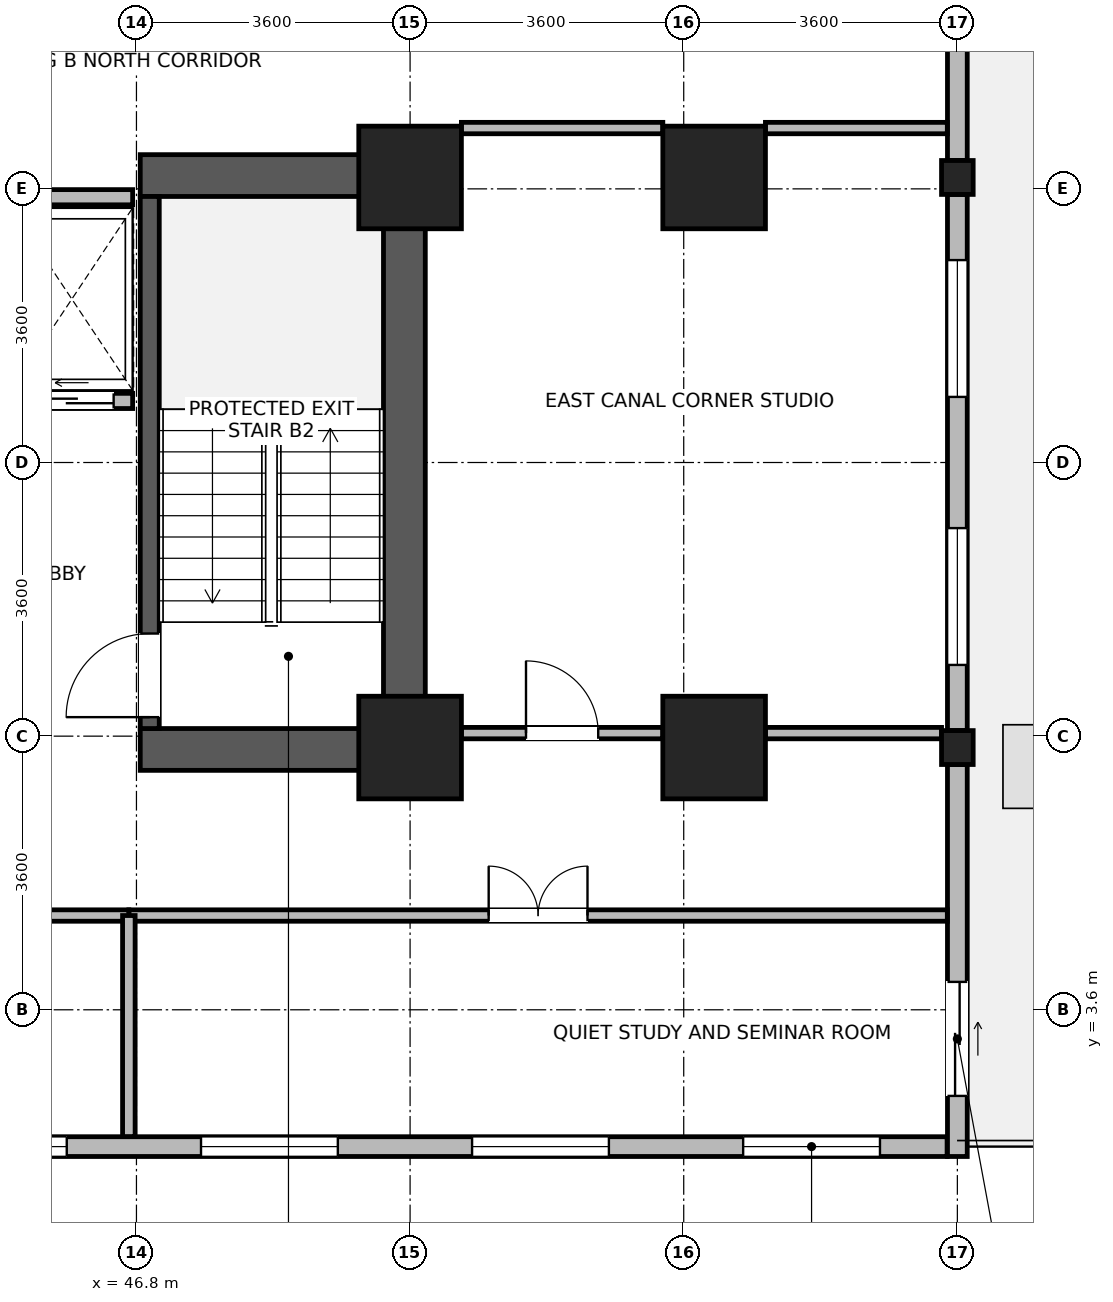
"""IFC4 building model, lengths in metres.
Left out: names, types, materials, properties, quantities, classifications, styles, units other than length and angle.
Written with IfcOpenShell. Run it as: python <this file> out.ifc"""

import sys

from ifc_helpers import new_model, si_unit, direction, frame, frame_2d, origin, origin_2d, place, context, subcontext, project, spatial, rectangle, i_section, extrude, source, transform, mapped, element, fill, save


model = new_model("IFC4")
c1 = context("Model", 3, precision=1e-05, world=origin(), true_north=direction((0.0, 1.0)))
c2 = subcontext(c1, "Body", "Model", "MODEL_VIEW")
j1 = project(units=[si_unit("LENGTHUNIT", "METRE"), si_unit("PLANEANGLEUNIT", "RADIAN")], contexts=[c1])
p1 = place(None, origin())
s1 = spatial("IfcSite", under=j1, at=p1, CompositionType="ELEMENT")
p2 = place(p1, origin())
s2 = spatial("IfcBuilding", under=s1, at=p2, CompositionType="ELEMENT")
p3 = place(p2, frame((0.0, 0.0, 43.8)))
s3 = spatial("IfcBuildingStorey", under=s2, at=p3, CompositionType="ELEMENT", Elevation=43.8)
p4 = place(p3, frame((50.325, 6.75, 0.0), z_axis=(0.0, 0.0, 1.0), x_axis=(0.0, 1.0, 0.0)))
e1 = element("IfcWall", 1, at=p4, inside=s3, PredefinedType="SHEAR", context=c2, shape_type="SweptSolid", body=[
    extrude(rectangle(XDim=8.1, YDim=0.55, at=frame_2d((4.05, 0.0))), origin(), (0.0, 0.0, 1.0), 3.45),
])
for number, where, z_axis, x_axis in (
    (2, (46.85, 7.025, 0.0), (0.0, 0.0, 1.0), (1.0, 0.0, 0.0)),
    (3, (46.85, 14.575, 0.0), (0.0, 0.0, 1.0), (1.0, 0.0, 0.0)),
):
    element("IfcWall", number, at=place(p3, frame(where, z_axis=z_axis, x_axis=x_axis)), inside=s3, PredefinedType="SHEAR", context=c2, shape_type="SweptSolid", body=[
        extrude(rectangle(XDim=3.2, YDim=0.55, at=frame_2d((1.6, 0.0))), origin(), (0.0, 0.0, 1.0), 3.45),
    ])
p5 = place(p3, frame((46.975, 7.3, 0.0), z_axis=(0.0, 0.0, 1.0), x_axis=(0.0, 1.0, 0.0)))
e4 = element("IfcWall", 4, at=p5, inside=s3, PredefinedType="SHEAR", context=c2, shape_type="SweptSolid", body=[
    extrude(rectangle(XDim=7.0, YDim=0.25, at=frame_2d((3.5, 0.0))), origin(), (0.0, 0.0, 1.0), 3.45),
])
p6 = place(p5, frame((0.15, 0.0, 0.0)))
e5 = element("IfcOpeningElement", 5, at=p6, cuts=e4, PredefinedType="OPENING", context=c2, shape_type="SweptSolid", body=[
    extrude(rectangle(XDim=1.1, YDim=2.08, at=frame_2d((0.55, 1.04))), frame((0.0, 0.135, 0.0), z_axis=(0.0, -1.0, 0.0), x_axis=(1.0, 0.0, 0.0)), (0.0, 0.0, 1.0), 0.27),
])
m1 = source(origin(), c2, "Body", "SweptSolid", [
    extrude(rectangle(XDim=1.35, YDim=1.35, at=origin_2d()), origin(), (0.0, 0.0, 1.0), 3.7),
])
for number, where, z_axis, x_axis in (
    (6, (50.4, 7.05, 0.0), (0.0, 0.0, 1.0), (1.0, 0.0, 0.0)),
    (7, (50.4, 14.55, 0.0), (0.0, 0.0, 1.0), (1.0, 0.0, 0.0)),
    (8, (54.4, 7.05, 0.0), (0.0, 0.0, 1.0), (1.0, 0.0, 0.0)),
    (9, (54.4, 14.55, 0.0), (0.0, 0.0, 1.0), (1.0, 0.0, 0.0)),
):
    element("IfcColumn", number, at=place(p3, frame(where, z_axis=z_axis, x_axis=x_axis)), inside=s3, PredefinedType="COLUMN", context=c2, shape_type="MappedRepresentation", body=[
        mapped(m1, transform((0.0, 0.0, 0.0), x_axis=(1.0, 0.0, 0.0), y_axis=(0.0, 1.0, 0.0), z_axis=(0.0, 0.0, 1.0), scale=1.0)),
    ])
m2 = source(origin(), c2, "Body", "SweptSolid", [
    extrude(i_section(OverallWidth=0.416, OverallDepth=0.446, WebThickness=0.029, FlangeThickness=0.04, FilletRadius=0.015, at=origin_2d()), origin(), (0.0, 0.0, 1.0), 3.7),
])
for number, where, z_axis, x_axis in (
    (10, (57.6, 7.05, 0.0), (0.0, 0.0, 1.0), (1.0, 0.0, 0.0)),
    (11, (57.6, 14.55, 0.0), (0.0, 0.0, 1.0), (1.0, 0.0, 0.0)),
):
    element("IfcColumn", number, at=place(p3, frame(where, z_axis=z_axis, x_axis=x_axis)), inside=s3, PredefinedType="COLUMN", context=c2, shape_type="MappedRepresentation", body=[
        mapped(m2, transform((0.0, 0.0, 0.0), x_axis=(1.0, 0.0, 0.0), y_axis=(0.0, 1.0, 0.0), z_axis=(0.0, 0.0, 1.0), scale=1.0)),
    ])
p7 = place(p3, frame((57.465, 1.8, 0.0), z_axis=(0.0, 0.0, 1.0), x_axis=(-1.0, 0.0, 0.0)))
e12 = element("IfcWall", 12, at=p7, inside=s3, PredefinedType="STANDARD", context=c2, shape_type="SweptSolid", body=[
    extrude(rectangle(XDim=28.53, YDim=0.26, at=frame_2d((14.265, 0.0))), origin(), (0.0, 0.0, 1.0), 3.43),
])
p8 = place(p7, frame((0.883, 0.0, 0.85)))
e13 = element("IfcOpeningElement", 13, at=p8, cuts=e12, PredefinedType="OPENING", context=c2, shape_type="SweptSolid", body=[
    extrude(rectangle(XDim=1.8, YDim=1.85, at=frame_2d((0.9, 0.925))), frame((0.0, 0.14, 0.0), z_axis=(0.0, -1.0, 0.0), x_axis=(1.0, 0.0, 0.0)), (0.0, 0.0, 1.0), 0.28),
])
p9 = place(p7, frame((4.449, 0.0, 0.85)))
e14 = element("IfcOpeningElement", 14, at=p9, cuts=e12, PredefinedType="OPENING", context=c2, shape_type="SweptSolid", body=[
    extrude(rectangle(XDim=1.8, YDim=1.85, at=frame_2d((0.9, 0.925))), frame((0.0, 0.14, 0.0), z_axis=(0.0, -1.0, 0.0), x_axis=(1.0, 0.0, 0.0)), (0.0, 0.0, 1.0), 0.28),
])
p10 = place(p7, frame((8.016, 0.0, 0.85)))
e15 = element("IfcOpeningElement", 15, at=p10, cuts=e12, PredefinedType="OPENING", context=c2, shape_type="SweptSolid", body=[
    extrude(rectangle(XDim=1.8, YDim=1.85, at=frame_2d((0.9, 0.925))), frame((0.0, 0.14, 0.0), z_axis=(0.0, -1.0, 0.0), x_axis=(1.0, 0.0, 0.0)), (0.0, 0.0, 1.0), 0.28),
])
p11 = place(p7, frame((11.582, 0.0, 0.85)))
e16 = element("IfcOpeningElement", 16, at=p11, cuts=e12, PredefinedType="OPENING", context=c2, shape_type="SweptSolid", body=[
    extrude(rectangle(XDim=1.8, YDim=1.85, at=frame_2d((0.9, 0.925))), frame((0.0, 0.14, 0.0), z_axis=(0.0, -1.0, 0.0), x_axis=(1.0, 0.0, 0.0)), (0.0, 0.0, 1.0), 0.28),
])
p12 = place(p7, frame((15.148, 0.0, 0.85)))
e17 = element("IfcOpeningElement", 17, at=p12, cuts=e12, PredefinedType="OPENING", context=c2, shape_type="SweptSolid", body=[
    extrude(rectangle(XDim=1.8, YDim=1.85, at=frame_2d((0.9, 0.925))), frame((0.0, 0.14, 0.0), z_axis=(0.0, -1.0, 0.0), x_axis=(1.0, 0.0, 0.0)), (0.0, 0.0, 1.0), 0.28),
])
p13 = place(p7, frame((22.281, 0.0, 0.85)))
e18 = element("IfcOpeningElement", 18, at=p13, cuts=e12, PredefinedType="OPENING", context=c2, shape_type="SweptSolid", body=[
    extrude(rectangle(XDim=1.8, YDim=1.85, at=frame_2d((0.9, 0.925))), frame((0.0, 0.14, 0.0), z_axis=(0.0, -1.0, 0.0), x_axis=(1.0, 0.0, 0.0)), (0.0, 0.0, 1.0), 0.28),
])
p14 = place(p7, frame((25.847, 0.0, 0.85)))
e19 = element("IfcOpeningElement", 19, at=p14, cuts=e12, PredefinedType="OPENING", context=c2, shape_type="SweptSolid", body=[
    extrude(rectangle(XDim=1.8, YDim=1.85, at=frame_2d((0.9, 0.925))), frame((0.0, 0.14, 0.0), z_axis=(0.0, -1.0, 0.0), x_axis=(1.0, 0.0, 0.0)), (0.0, 0.0, 1.0), 0.28),
])
p15 = place(p3, frame((57.6, 6.826, 0.0), z_axis=(0.0, 0.0, 1.0), x_axis=(0.0, -1.0, 0.0)))
e20 = element("IfcWall", 20, at=p15, inside=s3, PredefinedType="STANDARD", context=c2, shape_type="SweptSolid", body=[
    extrude(rectangle(XDim=5.156, YDim=0.26, at=frame_2d((2.578, 0.0))), origin(), (0.0, 0.0, 1.0), 3.43),
])
p16 = place(p15, frame((2.859, 0.0, 0.0)))
e21 = element("IfcOpeningElement", 21, at=p16, cuts=e20, PredefinedType="OPENING", context=c2, shape_type="SweptSolid", body=[
    extrude(rectangle(XDim=1.5, YDim=2.15, at=frame_2d((0.75, 1.075))), frame((0.0, 0.14, 0.0), z_axis=(0.0, -1.0, 0.0), x_axis=(1.0, 0.0, 0.0)), (0.0, 0.0, 1.0), 0.28),
])
p17 = place(p3, frame((57.6, 14.326, 0.0), z_axis=(0.0, 0.0, 1.0), x_axis=(0.0, -1.0, 0.0)))
e22 = element("IfcWall", 22, at=p17, inside=s3, PredefinedType="STANDARD", context=c2, shape_type="SweptSolid", body=[
    extrude(rectangle(XDim=7.052, YDim=0.26, at=frame_2d((3.526, 0.0))), origin(), (0.0, 0.0, 1.0), 2.93),
])
p18 = place(p17, frame((0.863, 0.0, 0.85)))
e23 = element("IfcOpeningElement", 23, at=p18, cuts=e22, PredefinedType="OPENING", context=c2, shape_type="SweptSolid", body=[
    extrude(rectangle(XDim=1.8, YDim=1.85, at=frame_2d((0.9, 0.925))), frame((0.0, 0.14, 0.0), z_axis=(0.0, -1.0, 0.0), x_axis=(1.0, 0.0, 0.0)), (0.0, 0.0, 1.0), 0.28),
])
p19 = place(p17, frame((4.389, 0.0, 0.85)))
e24 = element("IfcOpeningElement", 24, at=p19, cuts=e22, PredefinedType="OPENING", context=c2, shape_type="SweptSolid", body=[
    extrude(rectangle(XDim=1.8, YDim=1.85, at=frame_2d((0.9, 0.925))), frame((0.0, 0.14, 0.0), z_axis=(0.0, -1.0, 0.0), x_axis=(1.0, 0.0, 0.0)), (0.0, 0.0, 1.0), 0.28),
])
p20 = place(p3, frame((57.6, 21.376, 0.0), z_axis=(0.0, 0.0, 1.0), x_axis=(0.0, -1.0, 0.0)))
e25 = element("IfcWall", 25, at=p20, inside=s3, PredefinedType="STANDARD", context=c2, shape_type="SweptSolid", body=[
    extrude(rectangle(XDim=6.602, YDim=0.26, at=frame_2d((3.301, 0.0))), origin(), (0.0, 0.0, 1.0), 2.93),
])
p21 = place(p20, frame((0.75, 0.0, 0.85)))
e26 = element("IfcOpeningElement", 26, at=p21, cuts=e25, PredefinedType="OPENING", context=c2, shape_type="SweptSolid", body=[
    extrude(rectangle(XDim=1.8, YDim=1.85, at=frame_2d((0.9, 0.925))), frame((0.0, 0.14, 0.0), z_axis=(0.0, -1.0, 0.0), x_axis=(1.0, 0.0, 0.0)), (0.0, 0.0, 1.0), 0.28),
])
p22 = place(p3, frame((45.15, 11.61, 0.0), z_axis=(0.0, 0.0, 1.0), x_axis=(1.0, 0.0, 0.0)))
e27 = element("IfcWall", 27, at=p22, inside=s3, PredefinedType="PARTITIONING", context=c2, shape_type="SweptSolid", body=[
    extrude(rectangle(XDim=1.6, YDim=0.2, at=frame_2d((0.8, 0.0))), origin(), (0.0, 0.0, 1.0), 3.43),
])
p23 = place(p22, frame((0.25, 0.0, 0.0)))
e28 = element("IfcOpeningElement", 28, at=p23, cuts=e27, PredefinedType="OPENING", context=c2, shape_type="SweptSolid", body=[
    extrude(rectangle(XDim=1.1, YDim=2.12, at=frame_2d((0.55, 1.06))), frame((0.0, 0.11, 0.0), z_axis=(0.0, -1.0, 0.0), x_axis=(1.0, 0.0, 0.0)), (0.0, 0.0, 1.0), 0.22),
])
p24 = place(p3, frame((45.15, 14.29, 0.0), z_axis=(0.0, 0.0, 1.0), x_axis=(1.0, 0.0, 0.0)))
e29 = element("IfcWall", 29, at=p24, inside=s3, PredefinedType="PARTITIONING", context=c2, shape_type="SweptSolid", body=[
    extrude(rectangle(XDim=1.6, YDim=0.2, at=frame_2d((0.8, 0.0))), origin(), (0.0, 0.0, 1.0), 2.23),
])
p25 = place(p3, frame((46.7, 4.84, 0.0), z_axis=(0.0, 0.0, 1.0), x_axis=(1.0, 0.0, 0.0)))
e30 = element("IfcWall", 30, at=p25, inside=s3, PredefinedType="PARTITIONING", context=c2, shape_type="SweptSolid", body=[
    extrude(rectangle(XDim=10.768, YDim=0.15, at=frame_2d((5.384, 0.0))), origin(), (0.0, 0.0, 1.0), 3.43),
])
p26 = place(p25, frame((4.734, 0.0, 0.0)))
e31 = element("IfcOpeningElement", 31, at=p26, cuts=e30, PredefinedType="OPENING", context=c2, shape_type="SweptSolid", body=[
    extrude(rectangle(XDim=1.3, YDim=2.12, at=frame_2d((0.65, 1.06))), frame((0.0, 0.085, 0.0), z_axis=(0.0, -1.0, 0.0), x_axis=(1.0, 0.0, 0.0)), (0.0, 0.0, 1.0), 0.17),
])
p27 = place(p3, frame((37.5, 4.84, 0.0), z_axis=(0.0, 0.0, 1.0), x_axis=(1.0, 0.0, 0.0)))
e32 = element("IfcWall", 32, at=p27, inside=s3, PredefinedType="PARTITIONING", context=c2, shape_type="SweptSolid", body=[
    extrude(rectangle(XDim=9.2, YDim=0.15, at=frame_2d((4.6, 0.0))), origin(), (0.0, 0.0, 1.0), 3.43),
])
p28 = place(p27, frame((4.125, 0.0, 0.0)))
e33 = element("IfcOpeningElement", 33, at=p28, cuts=e32, PredefinedType="OPENING", context=c2, shape_type="SweptSolid", body=[
    extrude(rectangle(XDim=0.95, YDim=2.1, at=frame_2d((0.475, 1.05))), frame((0.0, 0.085, 0.0), z_axis=(0.0, -1.0, 0.0), x_axis=(1.0, 0.0, 0.0)), (0.0, 0.0, 1.0), 0.17),
])
p29 = place(p3, frame((51.075, 7.24, 0.0), z_axis=(0.0, 0.0, 1.0), x_axis=(1.0, 0.0, 0.0)))
e34 = element("IfcWall", 34, at=p29, inside=s3, PredefinedType="PARTITIONING", context=c2, shape_type="SweptSolid", body=[
    extrude(rectangle(XDim=2.65, YDim=0.15, at=frame_2d((1.325, 0.0))), origin(), (0.0, 0.0, 1.0), 2.78),
])
p30 = place(p29, frame((0.85, 0.0, 0.0)))
e35 = element("IfcOpeningElement", 35, at=p30, cuts=e34, PredefinedType="OPENING", context=c2, shape_type="SweptSolid", body=[
    extrude(rectangle(XDim=0.95, YDim=2.1, at=frame_2d((0.475, 1.05))), frame((0.0, 0.085, 0.0), z_axis=(0.0, -1.0, 0.0), x_axis=(1.0, 0.0, 0.0)), (0.0, 0.0, 1.0), 0.17),
])
p31 = place(p3, frame((55.075, 7.24, 0.0), z_axis=(0.0, 0.0, 1.0), x_axis=(1.0, 0.0, 0.0)))
e36 = element("IfcWall", 36, at=p31, inside=s3, PredefinedType="PARTITIONING", context=c2, shape_type="SweptSolid", body=[
    extrude(rectangle(XDim=2.317, YDim=0.15, at=frame_2d((1.159, 0.0))), origin(), (0.0, 0.0, 1.0), 2.78),
])
p32 = place(p3, frame((51.075, 15.2, 0.0), z_axis=(0.0, 0.0, 1.0), x_axis=(1.0, 0.0, 0.0)))
e37 = element("IfcWall", 37, at=p32, inside=s3, PredefinedType="PARTITIONING", context=c2, shape_type="SweptSolid", body=[
    extrude(rectangle(XDim=2.65, YDim=0.15, at=frame_2d((1.325, 0.0))), origin(), (0.0, 0.0, 1.0), 3.43),
])
p33 = place(p3, frame((55.075, 15.2, 0.0), z_axis=(0.0, 0.0, 1.0), x_axis=(1.0, 0.0, 0.0)))
e38 = element("IfcWall", 38, at=p33, inside=s3, PredefinedType="PARTITIONING", context=c2, shape_type="SweptSolid", body=[
    extrude(rectangle(XDim=2.393, YDim=0.15, at=frame_2d((1.197, 0.0))), origin(), (0.0, 0.0, 1.0), 3.43),
])
p34 = place(p3, frame((46.7, 1.932, 0.0), z_axis=(0.0, 0.0, 1.0), x_axis=(0.0, 1.0, 0.0)))
e39 = element("IfcWall", 39, at=p34, inside=s3, PredefinedType="PARTITIONING", context=c2, shape_type="SweptSolid", body=[
    extrude(rectangle(XDim=2.908, YDim=0.165, at=frame_2d((1.454, 0.0))), origin(), (0.0, 0.0, 1.0), 3.43),
])
p35 = place(p8, origin())
e40 = element("IfcWindow", 40, at=p35, inside=s3, PartitioningType="SINGLE_PANEL", PredefinedType="WINDOW", context=c2, shape_type="SweptSolid", body=[
    extrude(rectangle(XDim=1.8, YDim=1.85, at=frame_2d((0.9, 0.925))), frame((0.0, 0.03, 0.0), z_axis=(0.0, -1.0, 0.0), x_axis=(1.0, 0.0, 0.0)), (0.0, 0.0, 1.0), 0.06),
])
fill(e13, e40)
p36 = place(p9, origin())
e41 = element("IfcWindow", 41, at=p36, inside=s3, PartitioningType="SINGLE_PANEL", PredefinedType="WINDOW", context=c2, shape_type="SweptSolid", body=[
    extrude(rectangle(XDim=1.8, YDim=1.85, at=frame_2d((0.9, 0.925))), frame((0.0, 0.03, 0.0), z_axis=(0.0, -1.0, 0.0), x_axis=(1.0, 0.0, 0.0)), (0.0, 0.0, 1.0), 0.06),
])
fill(e14, e41)
p37 = place(p10, origin())
e42 = element("IfcWindow", 42, at=p37, inside=s3, PartitioningType="SINGLE_PANEL", PredefinedType="WINDOW", context=c2, shape_type="SweptSolid", body=[
    extrude(rectangle(XDim=1.8, YDim=1.85, at=frame_2d((0.9, 0.925))), frame((0.0, 0.03, 0.0), z_axis=(0.0, -1.0, 0.0), x_axis=(1.0, 0.0, 0.0)), (0.0, 0.0, 1.0), 0.06),
])
fill(e15, e42)
p38 = place(p11, origin())
e43 = element("IfcWindow", 43, at=p38, inside=s3, PartitioningType="SINGLE_PANEL", PredefinedType="WINDOW", context=c2, shape_type="SweptSolid", body=[
    extrude(rectangle(XDim=1.8, YDim=1.85, at=frame_2d((0.9, 0.925))), frame((0.0, 0.03, 0.0), z_axis=(0.0, -1.0, 0.0), x_axis=(1.0, 0.0, 0.0)), (0.0, 0.0, 1.0), 0.06),
])
fill(e16, e43)
p39 = place(p16, origin())
e44 = element("IfcDoor", 44, at=p39, inside=s3, OperationType="SLIDING_TO_LEFT", PredefinedType="DOOR", context=c2, shape_type="SweptSolid", body=[
    extrude(rectangle(XDim=1.5, YDim=2.15, at=frame_2d((0.75, 1.075))), frame((0.0, 0.025, 0.0), z_axis=(0.0, -1.0, 0.0), x_axis=(1.0, 0.0, 0.0)), (0.0, 0.0, 1.0), 0.05),
])
fill(e21, e44)
p40 = place(p18, origin())
e45 = element("IfcWindow", 45, at=p40, inside=s3, PartitioningType="SINGLE_PANEL", PredefinedType="WINDOW", context=c2, shape_type="SweptSolid", body=[
    extrude(rectangle(XDim=1.8, YDim=1.85, at=frame_2d((0.9, 0.925))), frame((0.0, 0.03, 0.0), z_axis=(0.0, -1.0, 0.0), x_axis=(1.0, 0.0, 0.0)), (0.0, 0.0, 1.0), 0.06),
])
fill(e23, e45)
p41 = place(p19, origin())
e46 = element("IfcWindow", 46, at=p41, inside=s3, PartitioningType="SINGLE_PANEL", PredefinedType="WINDOW", context=c2, shape_type="SweptSolid", body=[
    extrude(rectangle(XDim=1.8, YDim=1.85, at=frame_2d((0.9, 0.925))), frame((0.0, 0.03, 0.0), z_axis=(0.0, -1.0, 0.0), x_axis=(1.0, 0.0, 0.0)), (0.0, 0.0, 1.0), 0.06),
])
fill(e24, e46)
p42 = place(p6, origin())
e47 = element("IfcDoor", 47, at=p42, inside=s3, OperationType="SINGLE_SWING_LEFT", PredefinedType="DOOR", context=c2, shape_type="SweptSolid", body=[
    extrude(rectangle(XDim=1.1, YDim=2.08, at=frame_2d((0.55, 1.04))), frame((0.0, 0.025, 0.0), z_axis=(0.0, -1.0, 0.0), x_axis=(1.0, 0.0, 0.0)), (0.0, 0.0, 1.0), 0.05),
])
fill(e5, e47)
p43 = place(p23, origin())
e48 = element("IfcDoor", 48, at=p43, inside=s3, OperationType="SLIDING_TO_LEFT", PredefinedType="DOOR", context=c2, shape_type="SweptSolid", body=[
    extrude(rectangle(XDim=1.1, YDim=2.12, at=frame_2d((0.55, 1.06))), frame((0.0, 0.025, 0.0), z_axis=(0.0, -1.0, 0.0), x_axis=(1.0, 0.0, 0.0)), (0.0, 0.0, 1.0), 0.05),
])
fill(e28, e48)
p44 = place(p26, origin())
e49 = element("IfcDoor", 49, at=p44, inside=s3, OperationType="DOUBLE_DOOR_SINGLE_SWING", PredefinedType="DOOR", context=c2, shape_type="SweptSolid", body=[
    extrude(rectangle(XDim=1.3, YDim=2.12, at=frame_2d((0.65, 1.06))), frame((0.0, 0.025, 0.0), z_axis=(0.0, -1.0, 0.0), x_axis=(1.0, 0.0, 0.0)), (0.0, 0.0, 1.0), 0.05),
])
fill(e31, e49)
p45 = place(p30, origin())
e50 = element("IfcDoor", 50, at=p45, inside=s3, OperationType="SINGLE_SWING_LEFT", PredefinedType="DOOR", context=c2, shape_type="SweptSolid", body=[
    extrude(rectangle(XDim=0.95, YDim=2.1, at=frame_2d((0.475, 1.05))), frame((0.0, 0.025, 0.0), z_axis=(0.0, -1.0, 0.0), x_axis=(1.0, 0.0, 0.0)), (0.0, 0.0, 1.0), 0.05),
])
fill(e35, e50)
save(model, sys.argv[1])
